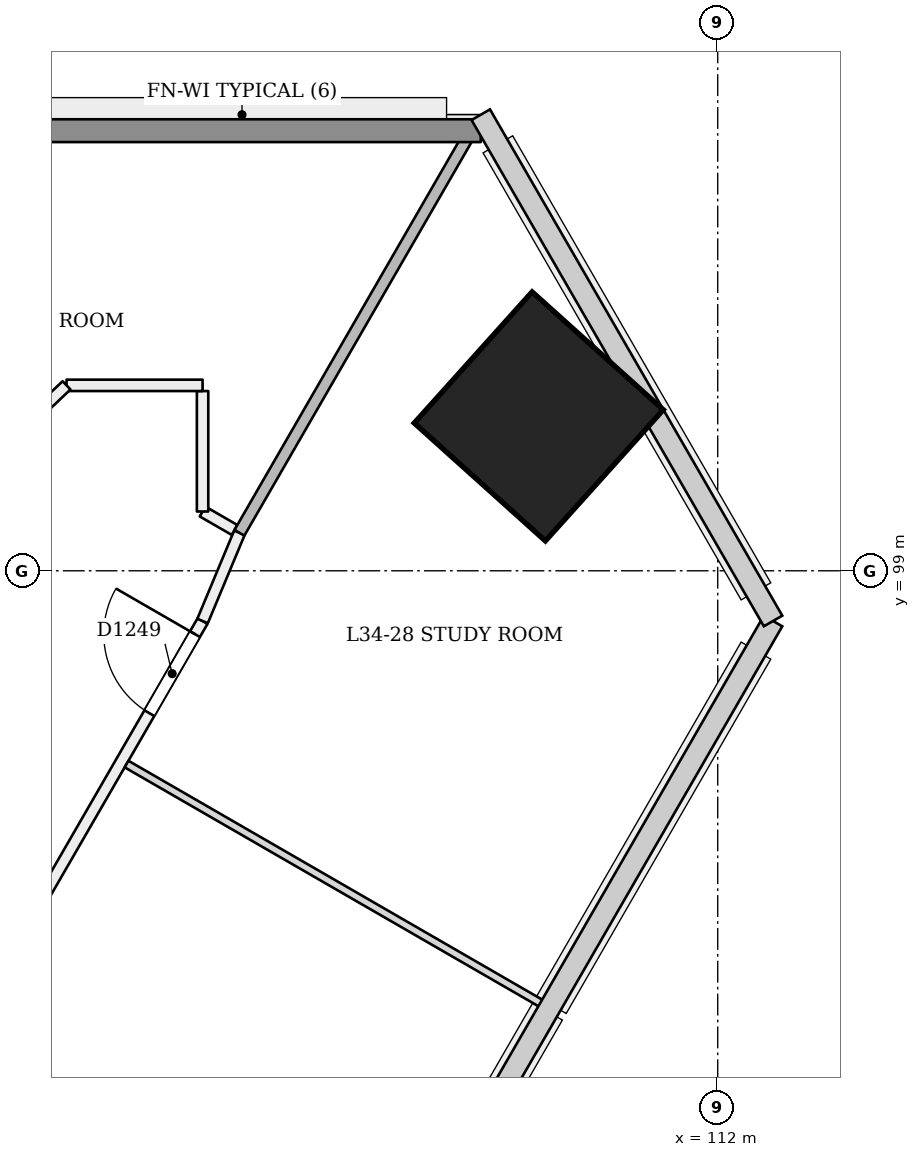
"""IFC4 building model, lengths in metres.
Left out: names, types, materials, properties, quantities, classifications, styles, units other than length and angle.
Written with IfcOpenShell. Run it as: python <this file> out.ifc"""

import sys

from ifc_helpers import new_model, si_unit, direction, frame, frame_2d, origin, origin_2d, place, context, subcontext, project, spatial, rectangle, extrude, element, fill, save


model = new_model("IFC4")
c1 = context("Model", 3, precision=1e-05, world=origin(), true_north=direction((0.0, 1.0)))
c2 = subcontext(c1, "Body", "Model", "MODEL_VIEW")
j1 = project(units=[si_unit("LENGTHUNIT", "METRE"), si_unit("PLANEANGLEUNIT", "RADIAN")], contexts=[c1])
p1 = place(None, origin())
s1 = spatial("IfcSite", under=j1, at=p1, CompositionType="ELEMENT")
p2 = place(p1, origin())
s2 = spatial("IfcBuilding", under=s1, at=p2, CompositionType="ELEMENT")
p3 = place(p2, frame((0.0, 0.0, 135.0)))
s3 = spatial("IfcBuildingStorey", under=s2, at=p3, CompositionType="ELEMENT", Elevation=135.0)
p4 = place(p3, frame((109.68, 101.02, 0.0), z_axis=(-0.028401814599, 0.009218727412, 0.999554076572), x_axis=(0.500749800061, -0.865307108475, 0.022209136917)))
e1 = element("IfcColumn", 1, at=p4, inside=s3, PredefinedType="COLUMN", context=c2, shape_type="SweptSolid", body=[
    extrude(rectangle(XDim=2.32, YDim=2.32, at=origin_2d()), origin(), (0.0, 0.0, 1.0), 3.602),
])
p5 = place(p3, frame((85.093, 63.473, 0.0), z_axis=(0.0, 0.0, 1.0), x_axis=(0.499997513821, 0.866026839176, 0.0)))
e2 = element("IfcWall", 2, at=p5, inside=s3, PredefinedType="PARTITIONING", context=c2, shape_type="SweptSolid", body=[
    extrude(rectangle(XDim=40.26, YDim=0.15, at=frame_2d((20.13, 0.0))), origin(), (0.0, 0.0, 1.0), 2.75),
])
p6 = place(p5, frame((0.429, 0.0, 0.0)))
e3 = element("IfcOpeningElement", 3, at=p6, cuts=e2, PredefinedType="OPENING", context=c2, shape_type="SweptSolid", body=[
    extrude(rectangle(XDim=1.2, YDim=2.1, at=frame_2d((0.6, 1.05))), frame((0.0, 0.085, 0.0), z_axis=(0.0, -1.0, 0.0), x_axis=(1.0, 0.0, 0.0)), (0.0, 0.0, 1.0), 0.171),
])
p7 = place(p5, frame((2.85, 0.0, 0.0)))
e4 = element("IfcOpeningElement", 4, at=p7, cuts=e2, PredefinedType="OPENING", context=c2, shape_type="SweptSolid", body=[
    extrude(rectangle(XDim=1.0, YDim=2.1, at=frame_2d((0.5, 1.05))), frame((0.0, 0.085, 0.0), z_axis=(0.0, -1.0, 0.0), x_axis=(1.0, 0.0, 0.0)), (0.0, 0.0, 1.0), 0.171),
])
p8 = place(p5, frame((8.28, 0.0, 0.0)))
e5 = element("IfcOpeningElement", 5, at=p8, cuts=e2, PredefinedType="OPENING", context=c2, shape_type="SweptSolid", body=[
    extrude(rectangle(XDim=1.2, YDim=2.1, at=frame_2d((0.6, 1.05))), frame((0.0, 0.085, 0.0), z_axis=(0.0, -1.0, 0.0), x_axis=(1.0, 0.0, 0.0)), (0.0, 0.0, 1.0), 0.171),
])
p9 = place(p5, frame((11.735, 0.0, 0.0)))
e6 = element("IfcOpeningElement", 6, at=p9, cuts=e2, PredefinedType="OPENING", context=c2, shape_type="SweptSolid", body=[
    extrude(rectangle(XDim=1.0, YDim=2.1, at=frame_2d((0.5, 1.05))), frame((0.0, 0.085, 0.0), z_axis=(0.0, -1.0, 0.0), x_axis=(1.0, 0.0, 0.0)), (0.0, 0.0, 1.0), 0.171),
])
p10 = place(p5, frame((18.41, 0.0, 0.0)))
e7 = element("IfcOpeningElement", 7, at=p10, cuts=e2, PredefinedType="OPENING", context=c2, shape_type="SweptSolid", body=[
    extrude(rectangle(XDim=1.0, YDim=2.1, at=frame_2d((0.5, 1.05))), frame((0.0, 0.085, 0.0), z_axis=(0.0, -1.0, 0.0), x_axis=(1.0, 0.0, 0.0)), (0.0, 0.0, 1.0), 0.171),
])
p11 = place(p5, frame((20.85, 0.0, 0.0)))
e8 = element("IfcOpeningElement", 8, at=p11, cuts=e2, PredefinedType="OPENING", context=c2, shape_type="SweptSolid", body=[
    extrude(rectangle(XDim=1.0, YDim=2.1, at=frame_2d((0.5, 1.05))), frame((0.0, 0.085, 0.0), z_axis=(0.0, -1.0, 0.0), x_axis=(1.0, 0.0, 0.0)), (0.0, 0.0, 1.0), 0.171),
])
p12 = place(p5, frame((26.38, 0.0, 0.0)))
e9 = element("IfcOpeningElement", 9, at=p12, cuts=e2, PredefinedType="OPENING", context=c2, shape_type="SweptSolid", body=[
    extrude(rectangle(XDim=1.0, YDim=2.1, at=frame_2d((0.5, 1.05))), frame((0.0, 0.085, 0.0), z_axis=(0.0, -1.0, 0.0), x_axis=(1.0, 0.0, 0.0)), (0.0, 0.0, 1.0), 0.171),
])
p13 = place(p5, frame((34.13, 0.0, 0.0)))
e10 = element("IfcOpeningElement", 10, at=p13, cuts=e2, PredefinedType="OPENING", context=c2, shape_type="SweptSolid", body=[
    extrude(rectangle(XDim=1.2, YDim=2.1, at=frame_2d((0.6, 1.05))), frame((0.0, 0.085, 0.0), z_axis=(0.0, -1.0, 0.0), x_axis=(1.0, 0.0, 0.0)), (0.0, 0.0, 1.0), 0.171),
])
p14 = place(p5, frame((38.86, 0.0, 0.0)))
e11 = element("IfcOpeningElement", 11, at=p14, cuts=e2, PredefinedType="OPENING", context=c2, shape_type="SweptSolid", body=[
    extrude(rectangle(XDim=1.2, YDim=2.1, at=frame_2d((0.6, 1.05))), frame((0.0, 0.085, 0.0), z_axis=(0.0, -1.0, 0.0), x_axis=(1.0, 0.0, 0.0)), (0.0, 0.0, 1.0), 0.171),
])
p15 = place(p3, frame((105.223, 98.34, 0.0), z_axis=(0.0, 0.0, 1.0), x_axis=(0.385373445666, 0.922760698868, 0.0)))
e12 = element("IfcWall", 12, at=p15, inside=s3, PredefinedType="PARTITIONING", context=c2, shape_type="SweptSolid", body=[
    extrude(rectangle(XDim=1.258, YDim=0.15, at=frame_2d((0.629, 0.0))), origin(), (0.0, 0.0, 1.0), 3.15),
])
p16 = place(p3, frame((105.643, 99.537, 0.0), z_axis=(0.0, 0.0, 1.0), x_axis=(-0.865942558441, 0.500143464899, 0.0)))
e13 = element("IfcWall", 13, at=p16, inside=s3, PredefinedType="PARTITIONING", context=c2, shape_type="SweptSolid", body=[
    extrude(rectangle(XDim=0.485, YDim=0.15, at=frame_2d((0.243, 0.0))), origin(), (0.0, 0.0, 1.0), 3.15),
])
p17 = place(p3, frame((105.223, 99.78, 0.0), z_axis=(0.0, 0.0, 1.0), x_axis=(0.0, 1.0, 0.0)))
e14 = element("IfcWall", 14, at=p17, inside=s3, PredefinedType="PARTITIONING", context=c2, shape_type="SweptSolid", body=[
    extrude(rectangle(XDim=1.585, YDim=0.15, at=frame_2d((0.792, 0.0))), origin(), (0.0, 0.0, 1.0), 3.15),
])
p18 = place(p3, frame((105.223, 101.439, 0.0), z_axis=(0.0, 0.0, 1.0), x_axis=(-1.0, 0.0, 0.0)))
e15 = element("IfcWall", 15, at=p18, inside=s3, PredefinedType="PARTITIONING", context=c2, shape_type="SweptSolid", body=[
    extrude(rectangle(XDim=1.79, YDim=0.15, at=frame_2d((0.895, 0.0))), origin(), (0.0, 0.0, 1.0), 3.15),
])
p19 = place(p3, frame((103.433, 101.439, 0.0), z_axis=(0.0, 0.0, 1.0), x_axis=(-0.725214952248, -0.688522529069, 0.0)))
e16 = element("IfcWall", 16, at=p19, inside=s3, PredefinedType="PARTITIONING", context=c2, shape_type="SweptSolid", body=[
    extrude(rectangle(XDim=0.566, YDim=0.15, at=frame_2d((0.283, 0.0))), origin(), (0.0, 0.0, 1.0), 3.15),
])
p20 = place(p3, frame((109.718, 93.285, 0.0), z_axis=(0.0, 0.0, 1.0), x_axis=(-0.866025401434, 0.500000004071, 0.0)))
e17 = element("IfcWall", 17, at=p20, inside=s3, PredefinedType="PARTITIONING", context=c2, shape_type="SweptSolid", body=[
    extrude(rectangle(XDim=6.345, YDim=0.1, at=frame_2d((3.173, 0.0))), origin(), (0.0, 0.0, 1.0), 2.65),
])
p21 = place(p3, frame((108.825, 104.9, 0.0), z_axis=(0.0, 0.0, 1.0), x_axis=(-0.500004896655, -0.866022576681, 0.0)))
e18 = element("IfcWall", 18, at=p21, inside=s3, PredefinedType="PARTITIONING", context=c2, shape_type="SweptSolid", body=[
    extrude(rectangle(XDim=6.235, YDim=0.15, at=frame_2d((3.118, 0.0))), origin(), (0.0, 0.0, 1.0), 2.65),
])
p22 = place(p3, frame((61.117, 104.79, 0.0), z_axis=(0.0, 0.0, 1.0), x_axis=(1.0, 0.0, 0.0)))
e19 = element("IfcWall", 19, at=p22, inside=s3, PredefinedType="SOLIDWALL", context=c2, shape_type="SweptSolid", body=[
    extrude(rectangle(XDim=47.766, YDim=0.3, at=frame_2d((23.883, 0.0))), origin(), (0.0, 0.0, 1.0), 2.65),
])
p23 = place(p14, origin())
e20 = element("IfcDoor", 20, at=p23, inside=s3, OperationType="SINGLE_SWING_RIGHT", PredefinedType="NOTDEFINED", context=c2, shape_type="SweptSolid", body=[
    extrude(rectangle(XDim=1.2, YDim=2.1, at=frame_2d((0.6, 1.05))), frame((0.0, 0.025, 0.0), z_axis=(0.0, -1.0, 0.0), x_axis=(1.0, 0.0, 0.0)), (0.0, 0.0, 1.0), 0.05),
])
fill(e11, e20)
save(model, sys.argv[1])
